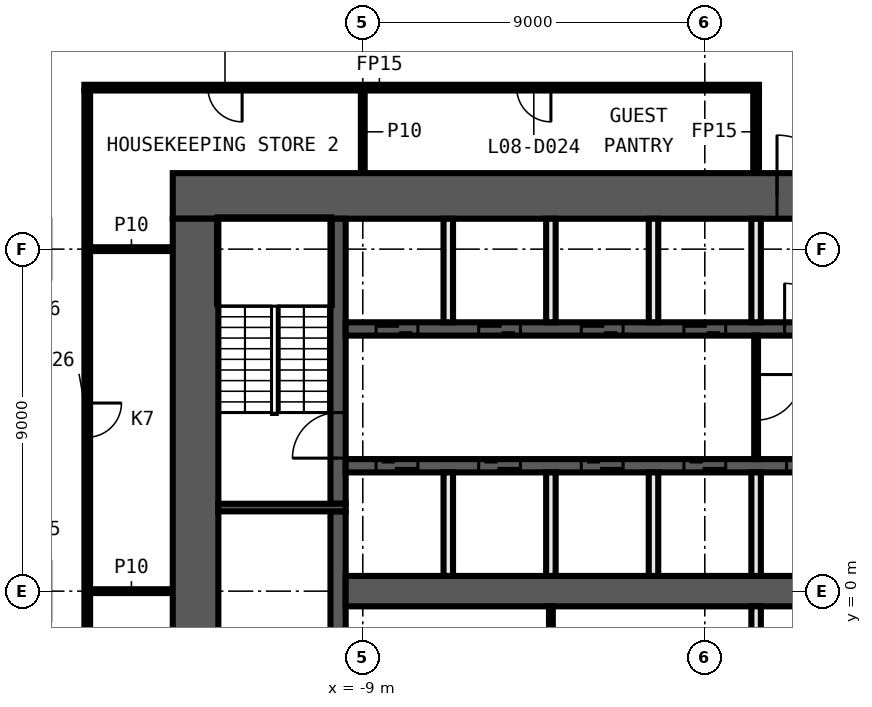
"""IFC4 building model, lengths in metres.
Left out: names, types, materials, properties, quantities, classifications, styles, units other than length and angle.
Written with IfcOpenShell. Run it as: python <this file> out.ifc"""

import sys

from ifc_helpers import new_model, si_unit, direction, frame, frame_2d, origin, place, context, subcontext, project, spatial, rectangle, extrude, element, fill, save


model = new_model("IFC4")
c1 = context("Model", 3, precision=1e-05, world=origin(), true_north=direction((0.0, 1.0)))
c2 = subcontext(c1, "Body", "Model", "MODEL_VIEW")
j1 = project(units=[si_unit("LENGTHUNIT", "METRE"), si_unit("PLANEANGLEUNIT", "RADIAN")], contexts=[c1])
p1 = place(None, origin())
s1 = spatial("IfcSite", under=j1, at=p1, CompositionType="ELEMENT")
p2 = place(p1, origin())
s2 = spatial("IfcBuilding", under=s1, at=p2, CompositionType="ELEMENT")
p3 = place(p2, frame((0.0, 0.0, 51.4)))
s3 = spatial("IfcBuildingStorey", under=s2, at=p3, CompositionType="ELEMENT", Elevation=51.4)
for number, where, z_axis, x_axis in (
    (1, (-16.175, 0.0, 0.0), (0.0, 0.0, 1.0), (1.0, 0.0, 0.0)),
    (2, (-16.175, 9.0, 0.0), (0.0, 0.0, 1.0), (1.0, 0.0, 0.0)),
):
    element("IfcWall", number, at=place(p3, frame(where, z_axis=z_axis, x_axis=x_axis)), inside=s3, PredefinedType="PARTITIONING", context=c2, shape_type="SweptSolid", body=[
        extrude(rectangle(XDim=2.175, YDim=0.1, at=frame_2d((1.087, 0.0))), origin(), (0.0, 0.0, 1.0), 3.3),
    ])
p4 = place(p3, frame((1.425, 13.25, 0.0), z_axis=(0.0, 0.0, 1.0), x_axis=(-1.0, 0.0, 0.0)))
e3 = element("IfcWall", 3, at=p4, inside=s3, PredefinedType="PARTITIONING", context=c2, shape_type="SweptSolid", body=[
    extrude(rectangle(XDim=17.75, YDim=0.15, at=frame_2d((8.875, 0.0))), origin(), (0.0, 0.0, 1.0), 3.3),
])
p5 = place(p4, frame((5.475, 0.0, 0.0)))
e4 = element("IfcOpeningElement", 4, at=p5, cuts=e3, PredefinedType="OPENING", context=c2, shape_type="SweptSolid", body=[
    extrude(rectangle(XDim=0.9, YDim=2.1, at=frame_2d((0.45, 1.05))), frame((0.0, 0.085, 0.0), z_axis=(0.0, -1.0, 0.0), x_axis=(1.0, 0.0, 0.0)), (0.0, 0.0, 1.0), 0.17),
])
p6 = place(p4, frame((13.6, 0.0, 0.0)))
e5 = element("IfcOpeningElement", 5, at=p6, cuts=e3, PredefinedType="OPENING", context=c2, shape_type="SweptSolid", body=[
    extrude(rectangle(XDim=0.9, YDim=2.1, at=frame_2d((0.45, 1.05))), frame((0.0, 0.085, 0.0), z_axis=(0.0, -1.0, 0.0), x_axis=(1.0, 0.0, 0.0)), (0.0, 0.0, 1.0), 0.17),
])
p7 = place(p3, frame((1.35, 11.0, 0.0), z_axis=(0.0, 0.0, 1.0), x_axis=(0.0, 1.0, 0.0)))
e6 = element("IfcWall", 6, at=p7, inside=s3, PredefinedType="PARTITIONING", context=c2, shape_type="SweptSolid", body=[
    extrude(rectangle(XDim=2.175, YDim=0.15, at=frame_2d((1.087, 0.0))), origin(), (0.0, 0.0, 1.0), 3.3),
])
p8 = place(p3, frame((-9.0, 11.0, 0.0), z_axis=(0.0, 0.0, 1.0), x_axis=(0.0, 1.0, 0.0)))
e7 = element("IfcWall", 7, at=p8, inside=s3, PredefinedType="PARTITIONING", context=c2, shape_type="SweptSolid", body=[
    extrude(rectangle(XDim=2.175, YDim=0.1, at=frame_2d((1.087, 0.0))), origin(), (0.0, 0.0, 1.0), 3.3),
])
p9 = place(p3, frame((-16.25, 13.175, 0.0), z_axis=(0.0, 0.0, 1.0), x_axis=(0.0, -1.0, 0.0)))
e8 = element("IfcWall", 8, at=p9, inside=s3, PredefinedType="PARTITIONING", context=c2, shape_type="SweptSolid", body=[
    extrude(rectangle(XDim=26.35, YDim=0.15, at=frame_2d((13.175, 0.0))), origin(), (0.0, 0.0, 1.0), 3.3),
])
p10 = place(p9, frame((17.225, 0.0, 0.0)))
e9 = element("IfcOpeningElement", 9, at=p10, cuts=e8, PredefinedType="OPENING", context=c2, shape_type="SweptSolid", body=[
    extrude(rectangle(XDim=0.9, YDim=2.1, at=frame_2d((0.45, 1.05))), frame((0.0, 0.085, 0.0), z_axis=(0.0, -1.0, 0.0), x_axis=(1.0, 0.0, 0.0)), (0.0, 0.0, 1.0), 0.17),
])
p11 = place(p9, frame((8.225, 0.0, 0.0)))
e10 = element("IfcOpeningElement", 10, at=p11, cuts=e8, PredefinedType="OPENING", context=c2, shape_type="SweptSolid", body=[
    extrude(rectangle(XDim=0.9, YDim=2.1, at=frame_2d((0.45, 1.05))), frame((0.0, 0.085, 0.0), z_axis=(0.0, -1.0, 0.0), x_axis=(1.0, 0.0, 0.0)), (0.0, 0.0, 1.0), 0.17),
])
p12 = place(p3, frame((-14.0, 10.4, 0.0), z_axis=(0.0, 0.0, 1.0), x_axis=(1.0, 0.0, 0.0)))
e11 = element("IfcWall", 11, at=p12, inside=s3, PredefinedType="SHEAR", context=c2, shape_type="SweptSolid", body=[
    extrude(rectangle(XDim=28.0, YDim=1.2, at=frame_2d((14.0, 0.0))), origin(), (0.0, 0.0, 1.0), 3.3),
])
p13 = place(p12, frame((15.9, 0.0, 0.0)))
e12 = element("IfcOpeningElement", 12, at=p13, cuts=e11, PredefinedType="OPENING", context=c2, shape_type="SweptSolid", body=[
    extrude(rectangle(XDim=1.6, YDim=2.1, at=frame_2d((0.8, 1.05))), frame((0.0, 0.61, 0.0), z_axis=(0.0, -1.0, 0.0), x_axis=(1.0, 0.0, 0.0)), (0.0, 0.0, 1.0), 1.22),
])
p14 = place(p3, frame((-13.4, -9.8, 0.0), z_axis=(0.0, 0.0, 1.0), x_axis=(0.0, 1.0, 0.0)))
e13 = element("IfcWall", 13, at=p14, inside=s3, PredefinedType="SHEAR", context=c2, shape_type="SweptSolid", body=[
    extrude(rectangle(XDim=19.6, YDim=1.2, at=frame_2d((9.8, 0.0))), origin(), (0.0, 0.0, 1.0), 3.3),
])
p15 = place(p3, frame((-9.65, -2.1, 0.0), z_axis=(0.0, 0.0, 1.0), x_axis=(0.0, 1.0, 0.0)))
e14 = element("IfcWall", 14, at=p15, inside=s3, PredefinedType="SHEAR", context=c2, shape_type="SweptSolid", body=[
    extrude(rectangle(XDim=4.2, YDim=0.4, at=frame_2d((2.1, 0.0))), origin(), (0.0, 0.0, 1.0), 3.3),
])
p16 = place(p3, frame((-9.65, 2.3, 0.0), z_axis=(0.0, 0.0, 1.0), x_axis=(0.0, 1.0, 0.0)))
e15 = element("IfcWall", 15, at=p16, inside=s3, PredefinedType="SHEAR", context=c2, shape_type="SweptSolid", body=[
    extrude(rectangle(XDim=7.5, YDim=0.4, at=frame_2d((3.75, 0.0))), origin(), (0.0, 0.0, 1.0), 3.3),
])
p17 = place(p16, frame((1.2, 0.0, 0.0)))
e16 = element("IfcOpeningElement", 16, at=p17, cuts=e15, PredefinedType="OPENING", context=c2, shape_type="SweptSolid", body=[
    extrude(rectangle(XDim=1.2, YDim=2.1, at=frame_2d((0.6, 1.05))), frame((0.0, 0.21, 0.0), z_axis=(0.0, -1.0, 0.0), x_axis=(1.0, 0.0, 0.0)), (0.0, 0.0, 1.0), 0.42),
])
p18 = place(p3, frame((-9.45, 2.2, 0.0), z_axis=(0.0, 0.0, 1.0), x_axis=(-1.0, 0.0, 0.0)))
e17 = element("IfcWall", 17, at=p18, inside=s3, PredefinedType="SHEAR", context=c2, shape_type="SweptSolid", body=[
    extrude(rectangle(XDim=3.35, YDim=0.2, at=frame_2d((1.675, 0.0))), origin(), (0.0, 0.0, 1.0), 3.3),
])
p19 = place(p3, frame((-9.45, 6.9, 0.0), z_axis=(0.0, 0.0, 1.0), x_axis=(1.0, 0.0, 0.0)))
e18 = element("IfcWall", 18, at=p19, inside=s3, PredefinedType="SHEAR", context=c2, shape_type="SweptSolid", body=[
    extrude(rectangle(XDim=18.9, YDim=0.35, at=frame_2d((9.45, 0.0))), origin(), (0.0, 0.0, 1.0), 3.3),
])
p20 = place(p19, frame((0.8, 0.0, 0.0)))
e19 = element("IfcOpeningElement", 19, at=p20, cuts=e18, PredefinedType="OPENING", context=c2, shape_type="SweptSolid", body=[
    extrude(rectangle(XDim=1.1, YDim=2.1, at=frame_2d((0.55, 1.05))), frame((0.0, 0.185, 0.0), z_axis=(0.0, -1.0, 0.0), x_axis=(1.0, 0.0, 0.0)), (0.0, 0.0, 1.0), 0.37),
])
p21 = place(p19, frame((3.5, 0.0, 0.0)))
e20 = element("IfcOpeningElement", 20, at=p21, cuts=e18, PredefinedType="OPENING", context=c2, shape_type="SweptSolid", body=[
    extrude(rectangle(XDim=1.1, YDim=2.1, at=frame_2d((0.55, 1.05))), frame((0.0, 0.185, 0.0), z_axis=(0.0, -1.0, 0.0), x_axis=(1.0, 0.0, 0.0)), (0.0, 0.0, 1.0), 0.37),
])
p22 = place(p19, frame((6.2, 0.0, 0.0)))
e21 = element("IfcOpeningElement", 21, at=p22, cuts=e18, PredefinedType="OPENING", context=c2, shape_type="SweptSolid", body=[
    extrude(rectangle(XDim=1.1, YDim=2.1, at=frame_2d((0.55, 1.05))), frame((0.0, 0.185, 0.0), z_axis=(0.0, -1.0, 0.0), x_axis=(1.0, 0.0, 0.0)), (0.0, 0.0, 1.0), 0.37),
])
p23 = place(p19, frame((8.9, 0.0, 0.0)))
e22 = element("IfcOpeningElement", 22, at=p23, cuts=e18, PredefinedType="OPENING", context=c2, shape_type="SweptSolid", body=[
    extrude(rectangle(XDim=1.1, YDim=2.1, at=frame_2d((0.55, 1.05))), frame((0.0, 0.185, 0.0), z_axis=(0.0, -1.0, 0.0), x_axis=(1.0, 0.0, 0.0)), (0.0, 0.0, 1.0), 0.37),
])
p24 = place(p19, frame((11.55, 0.0, 0.0)))
e23 = element("IfcOpeningElement", 23, at=p24, cuts=e18, PredefinedType="OPENING", context=c2, shape_type="SweptSolid", body=[
    extrude(rectangle(XDim=1.2, YDim=2.1, at=frame_2d((0.6, 1.05))), frame((0.0, 0.185, 0.0), z_axis=(0.0, -1.0, 0.0), x_axis=(1.0, 0.0, 0.0)), (0.0, 0.0, 1.0), 0.37),
])
p25 = place(p19, frame((14.3, 0.0, 0.0)))
e24 = element("IfcOpeningElement", 24, at=p25, cuts=e18, PredefinedType="OPENING", context=c2, shape_type="SweptSolid", body=[
    extrude(rectangle(XDim=1.1, YDim=2.1, at=frame_2d((0.55, 1.05))), frame((0.0, 0.185, 0.0), z_axis=(0.0, -1.0, 0.0), x_axis=(1.0, 0.0, 0.0)), (0.0, 0.0, 1.0), 0.37),
])
p26 = place(p19, frame((17.0, 0.0, 0.0)))
e25 = element("IfcOpeningElement", 25, at=p26, cuts=e18, PredefinedType="OPENING", context=c2, shape_type="SweptSolid", body=[
    extrude(rectangle(XDim=1.1, YDim=2.1, at=frame_2d((0.55, 1.05))), frame((0.0, 0.185, 0.0), z_axis=(0.0, -1.0, 0.0), x_axis=(1.0, 0.0, 0.0)), (0.0, 0.0, 1.0), 0.37),
])
p27 = place(p3, frame((9.45, 3.3, 0.0), z_axis=(0.0, 0.0, 1.0), x_axis=(-1.0, 0.0, 0.0)))
e26 = element("IfcWall", 26, at=p27, inside=s3, PredefinedType="SHEAR", context=c2, shape_type="SweptSolid", body=[
    extrude(rectangle(XDim=18.9, YDim=0.35, at=frame_2d((9.45, 0.0))), origin(), (0.0, 0.0, 1.0), 3.3),
])
p28 = place(p27, frame((17.0, 0.0, 0.0)))
e27 = element("IfcOpeningElement", 27, at=p28, cuts=e26, PredefinedType="OPENING", context=c2, shape_type="SweptSolid", body=[
    extrude(rectangle(XDim=1.1, YDim=2.1, at=frame_2d((0.55, 1.05))), frame((0.0, 0.185, 0.0), z_axis=(0.0, -1.0, 0.0), x_axis=(1.0, 0.0, 0.0)), (0.0, 0.0, 1.0), 0.37),
])
p29 = place(p27, frame((14.3, 0.0, 0.0)))
e28 = element("IfcOpeningElement", 28, at=p29, cuts=e26, PredefinedType="OPENING", context=c2, shape_type="SweptSolid", body=[
    extrude(rectangle(XDim=1.1, YDim=2.1, at=frame_2d((0.55, 1.05))), frame((0.0, 0.185, 0.0), z_axis=(0.0, -1.0, 0.0), x_axis=(1.0, 0.0, 0.0)), (0.0, 0.0, 1.0), 0.37),
])
p30 = place(p27, frame((11.6, 0.0, 0.0)))
e29 = element("IfcOpeningElement", 29, at=p30, cuts=e26, PredefinedType="OPENING", context=c2, shape_type="SweptSolid", body=[
    extrude(rectangle(XDim=1.1, YDim=2.1, at=frame_2d((0.55, 1.05))), frame((0.0, 0.185, 0.0), z_axis=(0.0, -1.0, 0.0), x_axis=(1.0, 0.0, 0.0)), (0.0, 0.0, 1.0), 0.37),
])
p31 = place(p27, frame((8.9, 0.0, 0.0)))
e30 = element("IfcOpeningElement", 30, at=p31, cuts=e26, PredefinedType="OPENING", context=c2, shape_type="SweptSolid", body=[
    extrude(rectangle(XDim=1.1, YDim=2.1, at=frame_2d((0.55, 1.05))), frame((0.0, 0.185, 0.0), z_axis=(0.0, -1.0, 0.0), x_axis=(1.0, 0.0, 0.0)), (0.0, 0.0, 1.0), 0.37),
])
p32 = place(p27, frame((6.2, 0.0, 0.0)))
e31 = element("IfcOpeningElement", 31, at=p32, cuts=e26, PredefinedType="OPENING", context=c2, shape_type="SweptSolid", body=[
    extrude(rectangle(XDim=1.1, YDim=2.1, at=frame_2d((0.55, 1.05))), frame((0.0, 0.185, 0.0), z_axis=(0.0, -1.0, 0.0), x_axis=(1.0, 0.0, 0.0)), (0.0, 0.0, 1.0), 0.37),
])
p33 = place(p27, frame((3.5, 0.0, 0.0)))
e32 = element("IfcOpeningElement", 32, at=p33, cuts=e26, PredefinedType="OPENING", context=c2, shape_type="SweptSolid", body=[
    extrude(rectangle(XDim=1.1, YDim=2.1, at=frame_2d((0.55, 1.05))), frame((0.0, 0.185, 0.0), z_axis=(0.0, -1.0, 0.0), x_axis=(1.0, 0.0, 0.0)), (0.0, 0.0, 1.0), 0.37),
])
p34 = place(p27, frame((0.9, 0.0, 0.0)))
e33 = element("IfcOpeningElement", 33, at=p34, cuts=e26, PredefinedType="OPENING", context=c2, shape_type="SweptSolid", body=[
    extrude(rectangle(XDim=0.9, YDim=2.1, at=frame_2d((0.45, 1.05))), frame((0.0, 0.185, 0.0), z_axis=(0.0, -1.0, 0.0), x_axis=(1.0, 0.0, 0.0)), (0.0, 0.0, 1.0), 0.37),
])
p35 = place(p3, frame((-9.45, 0.0, 0.0), z_axis=(0.0, 0.0, 1.0), x_axis=(1.0, 0.0, 0.0)))
e34 = element("IfcWall", 34, at=p35, inside=s3, PredefinedType="SHEAR", context=c2, shape_type="SweptSolid", body=[
    extrude(rectangle(XDim=18.9, YDim=0.8, at=frame_2d((9.45, 0.0))), origin(), (0.0, 0.0, 1.0), 3.3),
])
p36 = place(p3, frame((1.35, 6.725, 0.0), z_axis=(0.0, 0.0, 1.0), x_axis=(0.0, -1.0, 0.0)))
e35 = element("IfcWall", 35, at=p36, inside=s3, PredefinedType="PARTITIONING", context=c2, shape_type="SweptSolid", body=[
    extrude(rectangle(XDim=3.25, YDim=0.1, at=frame_2d((1.625, 0.0))), origin(), (0.0, 0.0, 1.0), 3.3),
])
p37 = place(p36, frame((1.025, 0.0, 0.0)))
e36 = element("IfcOpeningElement", 36, at=p37, cuts=e35, PredefinedType="OPENING", context=c2, shape_type="SweptSolid", body=[
    extrude(rectangle(XDim=1.2, YDim=2.1, at=frame_2d((0.6, 1.05))), frame((0.0, 0.06, 0.0), z_axis=(0.0, -1.0, 0.0), x_axis=(1.0, 0.0, 0.0)), (0.0, 0.0, 1.0), 0.12),
])
for number, where, z_axis, x_axis in (
    (37, (1.35, -3.125, 0.0), (0.0, 0.0, 1.0), (0.0, 1.0, 0.0)),
    (38, (1.35, 0.4, 0.0), (0.0, 0.0, 1.0), (0.0, 1.0, 0.0)),
    (39, (1.35, 7.075, 0.0), (0.0, 0.0, 1.0), (0.0, 1.0, 0.0)),
    (40, (-1.35, 0.4, 0.0), (0.0, 0.0, 1.0), (0.0, 1.0, 0.0)),
    (41, (-1.35, 7.075, 0.0), (0.0, 0.0, 1.0), (0.0, 1.0, 0.0)),
):
    element("IfcWall", number, at=place(p3, frame(where, z_axis=z_axis, x_axis=x_axis)), inside=s3, PredefinedType="SOLIDWALL", context=c2, shape_type="SweptSolid", body=[
        extrude(rectangle(XDim=2.725, YDim=0.25, at=frame_2d((1.363, 0.0))), origin(), (0.0, 0.0, 1.0), 3.3),
    ])
p38 = place(p3, frame((-4.05, -3.125, 0.0), z_axis=(0.0, 0.0, 1.0), x_axis=(0.0, 1.0, 0.0)))
e42 = element("IfcWall", 42, at=p38, inside=s3, PredefinedType="PARTITIONING", context=c2, shape_type="SweptSolid", body=[
    extrude(rectangle(XDim=2.725, YDim=0.1, at=frame_2d((1.363, 0.0))), origin(), (0.0, 0.0, 1.0), 3.3),
])
for number, where, z_axis, x_axis in (
    (43, (-4.05, 0.4, 0.0), (0.0, 0.0, 1.0), (0.0, 1.0, 0.0)),
    (44, (-4.05, 7.075, 0.0), (0.0, 0.0, 1.0), (0.0, 1.0, 0.0)),
    (45, (-6.75, 0.4, 0.0), (0.0, 0.0, 1.0), (0.0, 1.0, 0.0)),
    (46, (-6.75, 7.075, 0.0), (0.0, 0.0, 1.0), (0.0, 1.0, 0.0)),
):
    element("IfcWall", number, at=place(p3, frame(where, z_axis=z_axis, x_axis=x_axis)), inside=s3, PredefinedType="SOLIDWALL", context=c2, shape_type="SweptSolid", body=[
        extrude(rectangle(XDim=2.725, YDim=0.25, at=frame_2d((1.363, 0.0))), origin(), (0.0, 0.0, 1.0), 3.3),
    ])
p39 = place(p5, origin())
e47 = element("IfcDoor", 47, at=p39, inside=s3, OperationType="SINGLE_SWING_RIGHT", PredefinedType="DOOR", context=c2, shape_type="SweptSolid", body=[
    extrude(rectangle(XDim=0.9, YDim=2.1, at=frame_2d((0.45, 1.05))), frame((0.0, 0.025, 0.0), z_axis=(0.0, -1.0, 0.0), x_axis=(1.0, 0.0, 0.0)), (0.0, 0.0, 1.0), 0.05),
])
fill(e4, e47)
p40 = place(p6, origin())
e48 = element("IfcDoor", 48, at=p40, inside=s3, OperationType="SINGLE_SWING_LEFT", PredefinedType="DOOR", context=c2, shape_type="SweptSolid", body=[
    extrude(rectangle(XDim=0.9, YDim=2.1, at=frame_2d((0.45, 1.05))), frame((0.0, 0.025, 0.0), z_axis=(0.0, -1.0, 0.0), x_axis=(1.0, 0.0, 0.0)), (0.0, 0.0, 1.0), 0.05),
])
fill(e5, e48)
p41 = place(p11, origin())
e49 = element("IfcDoor", 49, at=p41, inside=s3, OperationType="SINGLE_SWING_RIGHT", PredefinedType="DOOR", context=c2, shape_type="SweptSolid", body=[
    extrude(rectangle(XDim=0.9, YDim=2.1, at=frame_2d((0.45, 1.05))), frame((0.0, 0.025, 0.0), z_axis=(0.0, -1.0, 0.0), x_axis=(1.0, 0.0, 0.0)), (0.0, 0.0, 1.0), 0.05),
])
fill(e10, e49)
p42 = place(p20, origin())
e50 = element("IfcDoor", 50, at=p42, inside=s3, OperationType="DOUBLE_DOOR_SLIDING", PredefinedType="DOOR", context=c2, shape_type="SweptSolid", body=[
    extrude(rectangle(XDim=1.1, YDim=2.1, at=frame_2d((0.55, 1.05))), frame((0.0, 0.025, 0.0), z_axis=(0.0, -1.0, 0.0), x_axis=(1.0, 0.0, 0.0)), (0.0, 0.0, 1.0), 0.05),
])
fill(e19, e50)
p43 = place(p21, origin())
e51 = element("IfcDoor", 51, at=p43, inside=s3, OperationType="DOUBLE_DOOR_SLIDING", PredefinedType="DOOR", context=c2, shape_type="SweptSolid", body=[
    extrude(rectangle(XDim=1.1, YDim=2.1, at=frame_2d((0.55, 1.05))), frame((0.0, 0.025, 0.0), z_axis=(0.0, -1.0, 0.0), x_axis=(1.0, 0.0, 0.0)), (0.0, 0.0, 1.0), 0.05),
])
fill(e20, e51)
p44 = place(p22, origin())
e52 = element("IfcDoor", 52, at=p44, inside=s3, OperationType="DOUBLE_DOOR_SLIDING", PredefinedType="DOOR", context=c2, shape_type="SweptSolid", body=[
    extrude(rectangle(XDim=1.1, YDim=2.1, at=frame_2d((0.55, 1.05))), frame((0.0, 0.025, 0.0), z_axis=(0.0, -1.0, 0.0), x_axis=(1.0, 0.0, 0.0)), (0.0, 0.0, 1.0), 0.05),
])
fill(e21, e52)
p45 = place(p23, origin())
e53 = element("IfcDoor", 53, at=p45, inside=s3, OperationType="DOUBLE_DOOR_SLIDING", PredefinedType="DOOR", context=c2, shape_type="SweptSolid", body=[
    extrude(rectangle(XDim=1.1, YDim=2.1, at=frame_2d((0.55, 1.05))), frame((0.0, 0.025, 0.0), z_axis=(0.0, -1.0, 0.0), x_axis=(1.0, 0.0, 0.0)), (0.0, 0.0, 1.0), 0.05),
])
fill(e22, e53)
p46 = place(p13, origin())
e54 = element("IfcDoor", 54, at=p46, inside=s3, OperationType="DOUBLE_DOOR_SINGLE_SWING", PredefinedType="DOOR", context=c2, shape_type="SweptSolid", body=[
    extrude(rectangle(XDim=1.6, YDim=2.1, at=frame_2d((0.8, 1.05))), frame((0.0, 0.025, 0.0), z_axis=(0.0, -1.0, 0.0), x_axis=(1.0, 0.0, 0.0)), (0.0, 0.0, 1.0), 0.05),
])
fill(e12, e54)
p47 = place(p24, origin())
e55 = element("IfcDoor", 55, at=p47, inside=s3, OperationType="SINGLE_SWING_LEFT", PredefinedType="DOOR", context=c2, shape_type="SweptSolid", body=[
    extrude(rectangle(XDim=1.2, YDim=2.1, at=frame_2d((0.6, 1.05))), frame((0.0, 0.025, 0.0), z_axis=(0.0, -1.0, 0.0), x_axis=(1.0, 0.0, 0.0)), (0.0, 0.0, 1.0), 0.05),
])
fill(e23, e55)
p48 = place(p28, origin())
e56 = element("IfcDoor", 56, at=p48, inside=s3, OperationType="DOUBLE_DOOR_SLIDING", PredefinedType="DOOR", context=c2, shape_type="SweptSolid", body=[
    extrude(rectangle(XDim=1.1, YDim=2.1, at=frame_2d((0.55, 1.05))), frame((0.0, 0.025, 0.0), z_axis=(0.0, -1.0, 0.0), x_axis=(1.0, 0.0, 0.0)), (0.0, 0.0, 1.0), 0.05),
])
fill(e27, e56)
p49 = place(p29, origin())
e57 = element("IfcDoor", 57, at=p49, inside=s3, OperationType="DOUBLE_DOOR_SLIDING", PredefinedType="DOOR", context=c2, shape_type="SweptSolid", body=[
    extrude(rectangle(XDim=1.1, YDim=2.1, at=frame_2d((0.55, 1.05))), frame((0.0, 0.025, 0.0), z_axis=(0.0, -1.0, 0.0), x_axis=(1.0, 0.0, 0.0)), (0.0, 0.0, 1.0), 0.05),
])
fill(e28, e57)
p50 = place(p30, origin())
e58 = element("IfcDoor", 58, at=p50, inside=s3, OperationType="DOUBLE_DOOR_SLIDING", PredefinedType="DOOR", context=c2, shape_type="SweptSolid", body=[
    extrude(rectangle(XDim=1.1, YDim=2.1, at=frame_2d((0.55, 1.05))), frame((0.0, 0.025, 0.0), z_axis=(0.0, -1.0, 0.0), x_axis=(1.0, 0.0, 0.0)), (0.0, 0.0, 1.0), 0.05),
])
fill(e29, e58)
p51 = place(p31, origin())
e59 = element("IfcDoor", 59, at=p51, inside=s3, OperationType="DOUBLE_DOOR_SLIDING", PredefinedType="DOOR", context=c2, shape_type="SweptSolid", body=[
    extrude(rectangle(XDim=1.1, YDim=2.1, at=frame_2d((0.55, 1.05))), frame((0.0, 0.025, 0.0), z_axis=(0.0, -1.0, 0.0), x_axis=(1.0, 0.0, 0.0)), (0.0, 0.0, 1.0), 0.05),
])
fill(e30, e59)
p52 = place(p32, origin())
e60 = element("IfcDoor", 60, at=p52, inside=s3, OperationType="DOUBLE_DOOR_SLIDING", PredefinedType="DOOR", context=c2, shape_type="SweptSolid", body=[
    extrude(rectangle(XDim=1.1, YDim=2.1, at=frame_2d((0.55, 1.05))), frame((0.0, 0.025, 0.0), z_axis=(0.0, -1.0, 0.0), x_axis=(1.0, 0.0, 0.0)), (0.0, 0.0, 1.0), 0.05),
])
fill(e31, e60)
p53 = place(p17, origin())
e61 = element("IfcDoor", 61, at=p53, inside=s3, OperationType="SINGLE_SWING_RIGHT", PredefinedType="DOOR", context=c2, shape_type="SweptSolid", body=[
    extrude(rectangle(XDim=1.2, YDim=2.1, at=frame_2d((0.6, 1.05))), frame((0.0, 0.025, 0.0), z_axis=(0.0, -1.0, 0.0), x_axis=(1.0, 0.0, 0.0)), (0.0, 0.0, 1.0), 0.05),
])
fill(e16, e61)
p54 = place(p37, origin())
e62 = element("IfcDoor", 62, at=p54, inside=s3, OperationType="SINGLE_SWING_LEFT", PredefinedType="DOOR", context=c2, shape_type="SweptSolid", body=[
    extrude(rectangle(XDim=1.2, YDim=2.1, at=frame_2d((0.6, 1.05))), frame((0.0, 0.025, 0.0), z_axis=(0.0, -1.0, 0.0), x_axis=(1.0, 0.0, 0.0)), (0.0, 0.0, 1.0), 0.05),
])
fill(e36, e62)
save(model, sys.argv[1])
